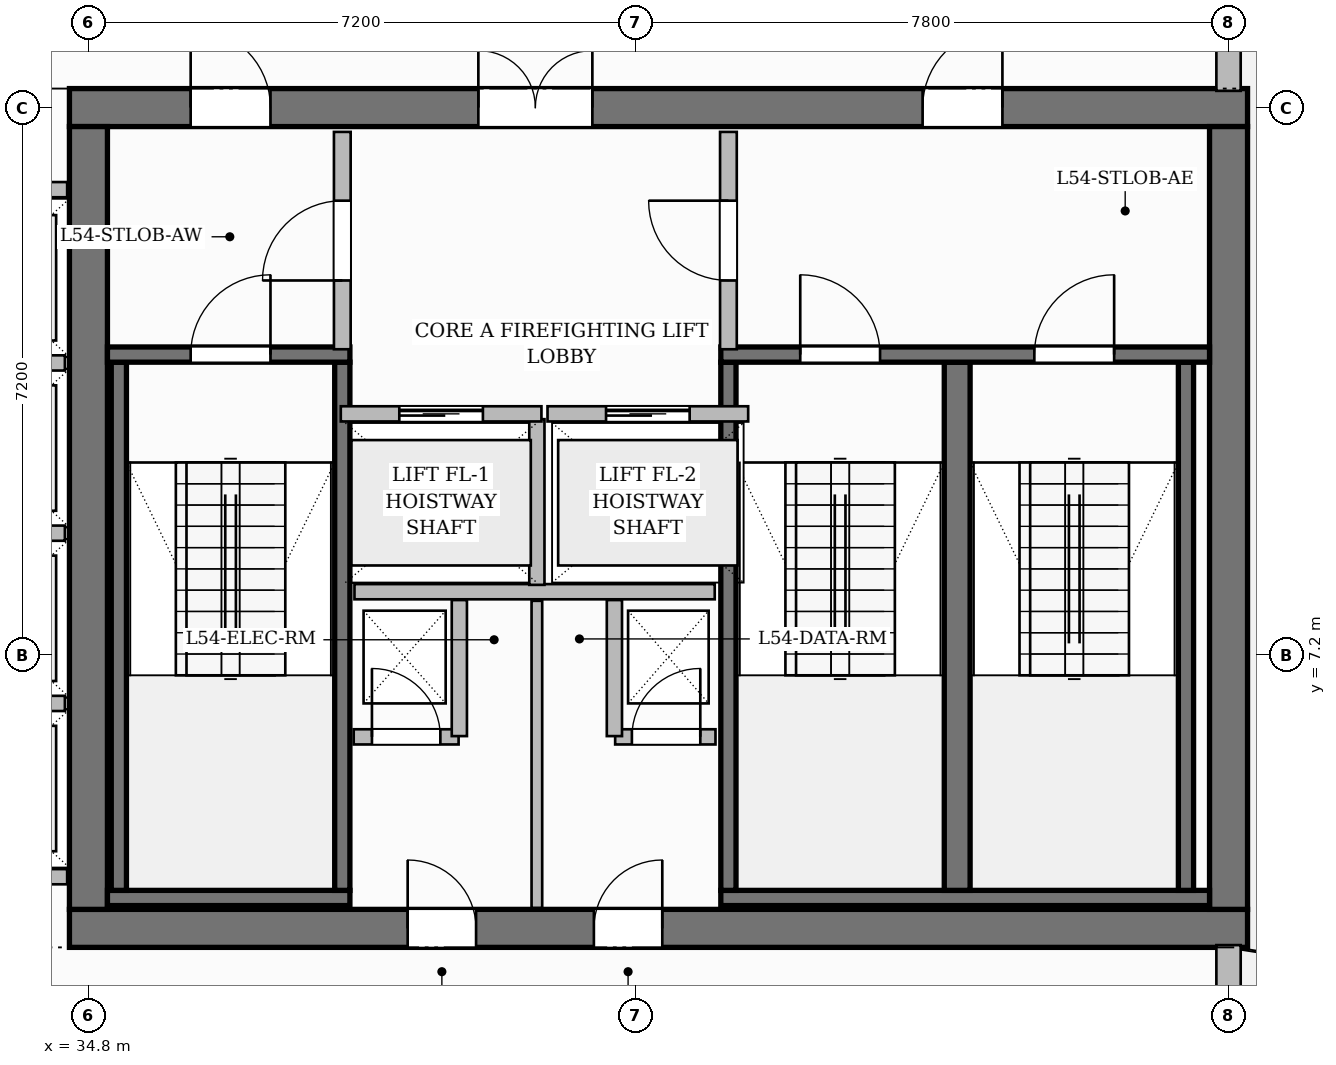
"""IFC4 building model, lengths in metres.
Left out: names, types, materials, properties, quantities, classifications, styles, units other than length and angle.
Written with IfcOpenShell. Run it as: python <this file> out.ifc"""

import sys

from ifc_helpers import new_model, si_unit, direction, frame, frame_2d, origin, place, context, subcontext, project, spatial, rectangle, extrude, source, transform, mapped, element, fill, save


model = new_model("IFC4")
c1 = context("Model", 3, precision=1e-05, world=origin(), true_north=direction((0.0, 1.0)))
c2 = subcontext(c1, "Body", "Model", "MODEL_VIEW")
j1 = project(units=[si_unit("LENGTHUNIT", "METRE"), si_unit("PLANEANGLEUNIT", "RADIAN")], contexts=[c1])
p1 = place(None, origin())
s1 = spatial("IfcSite", under=j1, at=p1, CompositionType="ELEMENT")
p2 = place(p1, origin())
s2 = spatial("IfcBuilding", under=s1, at=p2, CompositionType="ELEMENT")
p3 = place(p2, frame((0.0, 0.0, 217.3)))
s3 = spatial("IfcBuildingStorey", under=s2, at=p3, CompositionType="ELEMENT", Elevation=217.3)
p4 = place(p3, frame((34.55, 3.6, 0.0), z_axis=(0.0, 0.0, 1.0), x_axis=(1.0, 0.0, 0.0)))
e1 = element("IfcWall", 1, at=p4, inside=s3, PredefinedType="SHEAR", context=c2, shape_type="SweptSolid", body=[
    extrude(rectangle(XDim=15.5, YDim=0.5, at=frame_2d((7.75, 0.0))), origin(), (0.0, 0.0, 1.0), 3.85),
])
p5 = place(p4, frame((4.45, 0.0, 0.0)))
e2 = element("IfcOpeningElement", 2, at=p5, cuts=e1, PredefinedType="OPENING", context=c2, shape_type="SweptSolid", body=[
    extrude(rectangle(XDim=0.9, YDim=2.1, at=frame_2d((0.45, 1.05))), frame((0.0, 0.26, 0.0), z_axis=(0.0, -1.0, 0.0), x_axis=(1.0, 0.0, 0.0)), (0.0, 0.0, 1.0), 0.52),
])
p6 = place(p4, frame((6.9, 0.0, 0.0)))
e3 = element("IfcOpeningElement", 3, at=p6, cuts=e1, PredefinedType="OPENING", context=c2, shape_type="SweptSolid", body=[
    extrude(rectangle(XDim=0.9, YDim=2.1, at=frame_2d((0.45, 1.05))), frame((0.0, 0.26, 0.0), z_axis=(0.0, -1.0, 0.0), x_axis=(1.0, 0.0, 0.0)), (0.0, 0.0, 1.0), 0.52),
])
p7 = place(p3, frame((34.55, 14.4, 0.0), z_axis=(0.0, 0.0, 1.0), x_axis=(1.0, 0.0, 0.0)))
e4 = element("IfcWall", 4, at=p7, inside=s3, PredefinedType="SHEAR", context=c2, shape_type="SweptSolid", body=[
    extrude(rectangle(XDim=15.5, YDim=0.5, at=frame_2d((7.75, 0.0))), origin(), (0.0, 0.0, 1.0), 3.85),
])
p8 = place(p7, frame((5.38, 0.0, 0.0)))
e5 = element("IfcOpeningElement", 5, at=p8, cuts=e4, PredefinedType="OPENING", context=c2, shape_type="SweptSolid", body=[
    extrude(rectangle(XDim=1.5, YDim=2.2, at=frame_2d((0.75, 1.1))), frame((0.0, 0.26, 0.0), z_axis=(0.0, -1.0, 0.0), x_axis=(1.0, 0.0, 0.0)), (0.0, 0.0, 1.0), 0.52),
])
p9 = place(p7, frame((1.595, 0.0, 0.0)))
e6 = element("IfcOpeningElement", 6, at=p9, cuts=e4, PredefinedType="OPENING", context=c2, shape_type="SweptSolid", body=[
    extrude(rectangle(XDim=1.05, YDim=2.15, at=frame_2d((0.525, 1.075))), frame((0.0, 0.26, 0.0), z_axis=(0.0, -1.0, 0.0), x_axis=(1.0, 0.0, 0.0)), (0.0, 0.0, 1.0), 0.52),
])
p10 = place(p7, frame((11.225, 0.0, 0.0)))
e7 = element("IfcOpeningElement", 7, at=p10, cuts=e4, PredefinedType="OPENING", context=c2, shape_type="SweptSolid", body=[
    extrude(rectangle(XDim=1.05, YDim=2.15, at=frame_2d((0.525, 1.075))), frame((0.0, 0.26, 0.0), z_axis=(0.0, -1.0, 0.0), x_axis=(1.0, 0.0, 0.0)), (0.0, 0.0, 1.0), 0.52),
])
for number, where, z_axis, x_axis in (
    (8, (34.8, 3.85, 0.0), (0.0, 0.0, 1.0), (0.0, 1.0, 0.0)),
    (9, (49.8, 3.85, 0.0), (0.0, 0.0, 1.0), (0.0, 1.0, 0.0)),
):
    element("IfcWall", number, at=place(p3, frame(where, z_axis=z_axis, x_axis=x_axis)), inside=s3, PredefinedType="SHEAR", context=c2, shape_type="SweptSolid", body=[
        extrude(rectangle(XDim=10.3, YDim=0.5, at=frame_2d((5.15, 0.0))), origin(), (0.0, 0.0, 1.0), 3.85),
    ])
p11 = place(p3, frame((35.05, 4.0, 0.0), z_axis=(0.0, 0.0, 1.0), x_axis=(1.0, 0.0, 0.0)))
e10 = element("IfcWall", 10, at=p11, inside=s3, PredefinedType="SHEAR", context=c2, shape_type="SweptSolid", body=[
    extrude(rectangle(XDim=3.19, YDim=0.2, at=frame_2d((1.595, 0.0))), origin(), (0.0, 0.0, 1.0), 3.85),
])
for number, where, z_axis, x_axis in (
    (11, (35.2, 4.1, 0.0), (0.0, 0.0, 1.0), (0.0, 1.0, 0.0)),
    (12, (38.14, 4.1, 0.0), (0.0, 0.0, 1.0), (0.0, 1.0, 0.0)),
):
    element("IfcWall", number, at=place(p3, frame(where, z_axis=z_axis, x_axis=x_axis)), inside=s3, PredefinedType="SHEAR", context=c2, shape_type="SweptSolid", body=[
        extrude(rectangle(XDim=6.95, YDim=0.2, at=frame_2d((3.475, 0.0))), origin(), (0.0, 0.0, 1.0), 3.85),
    ])
p12 = place(p3, frame((35.05, 11.15, 0.0), z_axis=(0.0, 0.0, 1.0), x_axis=(1.0, 0.0, 0.0)))
e13 = element("IfcWall", 13, at=p12, inside=s3, PredefinedType="SHEAR", context=c2, shape_type="SweptSolid", body=[
    extrude(rectangle(XDim=3.19, YDim=0.2, at=frame_2d((1.595, 0.0))), origin(), (0.0, 0.0, 1.0), 3.85),
])
p13 = place(p12, frame((1.095, 0.0, 0.0)))
e14 = element("IfcOpeningElement", 14, at=p13, cuts=e13, PredefinedType="OPENING", context=c2, shape_type="SweptSolid", body=[
    extrude(rectangle(XDim=1.05, YDim=2.2, at=frame_2d((0.525, 1.1))), frame((0.0, 0.11, 0.0), z_axis=(0.0, -1.0, 0.0), x_axis=(1.0, 0.0, 0.0)), (0.0, 0.0, 1.0), 0.22),
])
p14 = place(p3, frame((43.12, 4.0, 0.0), z_axis=(0.0, 0.0, 1.0), x_axis=(1.0, 0.0, 0.0)))
e15 = element("IfcWall", 15, at=p14, inside=s3, PredefinedType="SHEAR", context=c2, shape_type="SweptSolid", body=[
    extrude(rectangle(XDim=6.43, YDim=0.2, at=frame_2d((3.215, 0.0))), origin(), (0.0, 0.0, 1.0), 3.85),
])
p15 = place(p3, frame((43.22, 4.1, 0.0), z_axis=(0.0, 0.0, 1.0), x_axis=(0.0, 1.0, 0.0)))
e16 = element("IfcWall", 16, at=p15, inside=s3, PredefinedType="SHEAR", context=c2, shape_type="SweptSolid", body=[
    extrude(rectangle(XDim=6.95, YDim=0.2, at=frame_2d((3.475, 0.0))), origin(), (0.0, 0.0, 1.0), 3.85),
])
p16 = place(p3, frame((46.23, 4.1, 0.0), z_axis=(0.0, 0.0, 1.0), x_axis=(0.0, 1.0, 0.0)))
e17 = element("IfcWall", 17, at=p16, inside=s3, PredefinedType="SHEAR", context=c2, shape_type="SweptSolid", body=[
    extrude(rectangle(XDim=6.95, YDim=0.34, at=frame_2d((3.475, 0.0))), origin(), (0.0, 0.0, 1.0), 3.85),
])
p17 = place(p3, frame((49.24, 4.1, 0.0), z_axis=(0.0, 0.0, 1.0), x_axis=(0.0, 1.0, 0.0)))
e18 = element("IfcWall", 18, at=p17, inside=s3, PredefinedType="SHEAR", context=c2, shape_type="SweptSolid", body=[
    extrude(rectangle(XDim=6.95, YDim=0.2, at=frame_2d((3.475, 0.0))), origin(), (0.0, 0.0, 1.0), 3.85),
])
p18 = place(p3, frame((43.12, 11.15, 0.0), z_axis=(0.0, 0.0, 1.0), x_axis=(1.0, 0.0, 0.0)))
e19 = element("IfcWall", 19, at=p18, inside=s3, PredefinedType="SHEAR", context=c2, shape_type="SweptSolid", body=[
    extrude(rectangle(XDim=6.43, YDim=0.2, at=frame_2d((3.215, 0.0))), origin(), (0.0, 0.0, 1.0), 3.85),
])
p19 = place(p18, frame((1.045, 0.0, 0.0)))
e20 = element("IfcOpeningElement", 20, at=p19, cuts=e19, PredefinedType="OPENING", context=c2, shape_type="SweptSolid", body=[
    extrude(rectangle(XDim=1.05, YDim=2.2, at=frame_2d((0.525, 1.1))), frame((0.0, 0.11, 0.0), z_axis=(0.0, -1.0, 0.0), x_axis=(1.0, 0.0, 0.0)), (0.0, 0.0, 1.0), 0.22),
])
p20 = place(p18, frame((4.125, 0.0, 0.0)))
e21 = element("IfcOpeningElement", 21, at=p20, cuts=e19, PredefinedType="OPENING", context=c2, shape_type="SweptSolid", body=[
    extrude(rectangle(XDim=1.05, YDim=2.2, at=frame_2d((0.525, 1.1))), frame((0.0, 0.11, 0.0), z_axis=(0.0, -1.0, 0.0), x_axis=(1.0, 0.0, 0.0)), (0.0, 0.0, 1.0), 0.22),
])
p21 = place(p3, frame((38.3, 8.03, 0.0), z_axis=(0.0, 0.0, 1.0), x_axis=(1.0, 0.0, 0.0)))
e22 = element("IfcWall", 22, at=p21, inside=s3, PredefinedType="PARTITIONING", context=c2, shape_type="SweptSolid", body=[
    extrude(rectangle(XDim=4.74, YDim=0.2, at=frame_2d((2.37, 0.0))), origin(), (0.0, 0.0, 1.0), 3.6),
])
p22 = place(p3, frame((40.7, 8.12, 0.0), z_axis=(0.0, 0.0, 1.0), x_axis=(0.0, 1.0, 0.0)))
e23 = element("IfcWall", 23, at=p22, inside=s3, PredefinedType="PARTITIONING", context=c2, shape_type="SweptSolid", body=[
    extrude(rectangle(XDim=2.18, YDim=0.2, at=frame_2d((1.09, 0.0))), origin(), (0.0, 0.0, 1.0), 3.6),
])
p23 = place(p3, frame((38.14, 11.22, 0.0), z_axis=(0.0, 0.0, 1.0), x_axis=(0.0, 1.0, 0.0)))
e24 = element("IfcWall", 24, at=p23, inside=s3, PredefinedType="PARTITIONING", context=c2, shape_type="SweptSolid", body=[
    extrude(rectangle(XDim=2.86, YDim=0.22, at=frame_2d((1.43, 0.0))), origin(), (0.0, 0.0, 1.0), 3.6),
])
p24 = place(p23, frame((0.905, 0.0, 0.0)))
e25 = element("IfcOpeningElement", 25, at=p24, cuts=e24, PredefinedType="OPENING", context=c2, shape_type="SweptSolid", body=[
    extrude(rectangle(XDim=1.05, YDim=2.15, at=frame_2d((0.525, 1.075))), frame((0.0, 0.12, 0.0), z_axis=(0.0, -1.0, 0.0), x_axis=(1.0, 0.0, 0.0)), (0.0, 0.0, 1.0), 0.24),
])
p25 = place(p3, frame((43.22, 11.22, 0.0), z_axis=(0.0, 0.0, 1.0), x_axis=(0.0, 1.0, 0.0)))
e26 = element("IfcWall", 26, at=p25, inside=s3, PredefinedType="PARTITIONING", context=c2, shape_type="SweptSolid", body=[
    extrude(rectangle(XDim=2.86, YDim=0.22, at=frame_2d((1.43, 0.0))), origin(), (0.0, 0.0, 1.0), 3.6),
])
p26 = place(p25, frame((0.905, 0.0, 0.0)))
e27 = element("IfcOpeningElement", 27, at=p26, cuts=e26, PredefinedType="OPENING", context=c2, shape_type="SweptSolid", body=[
    extrude(rectangle(XDim=1.05, YDim=2.15, at=frame_2d((0.525, 1.075))), frame((0.0, 0.12, 0.0), z_axis=(0.0, -1.0, 0.0), x_axis=(1.0, 0.0, 0.0)), (0.0, 0.0, 1.0), 0.24),
])
p27 = place(p3, frame((38.29, 6.12, 0.0), z_axis=(0.0, 0.0, 1.0), x_axis=(1.0, 0.0, 0.0)))
e28 = element("IfcWall", 28, at=p27, inside=s3, PredefinedType="PARTITIONING", context=c2, shape_type="SweptSolid", body=[
    extrude(rectangle(XDim=1.38, YDim=0.2, at=frame_2d((0.69, 0.0))), origin(), (0.0, 0.0, 1.0), 3.6),
])
p28 = place(p27, frame((0.24, 0.0, 0.0)))
e29 = element("IfcOpeningElement", 29, at=p28, cuts=e28, PredefinedType="OPENING", context=c2, shape_type="SweptSolid", body=[
    extrude(rectangle(XDim=0.9, YDim=2.1, at=frame_2d((0.45, 1.05))), frame((0.0, 0.11, 0.0), z_axis=(0.0, -1.0, 0.0), x_axis=(1.0, 0.0, 0.0)), (0.0, 0.0, 1.0), 0.22),
])
p29 = place(p3, frame((39.68, 6.13, 0.0), z_axis=(0.0, 0.0, 1.0), x_axis=(0.0, 1.0, 0.0)))
e30 = element("IfcWall", 30, at=p29, inside=s3, PredefinedType="PARTITIONING", context=c2, shape_type="SweptSolid", body=[
    extrude(rectangle(XDim=1.79, YDim=0.2, at=frame_2d((0.895, 0.0))), origin(), (0.0, 0.0, 1.0), 3.6),
])
p30 = place(p3, frame((41.73, 6.12, 0.0), z_axis=(0.0, 0.0, 1.0), x_axis=(1.0, 0.0, 0.0)))
e31 = element("IfcWall", 31, at=p30, inside=s3, PredefinedType="PARTITIONING", context=c2, shape_type="SweptSolid", body=[
    extrude(rectangle(XDim=1.32, YDim=0.2, at=frame_2d((0.66, 0.0))), origin(), (0.0, 0.0, 1.0), 3.6),
])
p31 = place(p30, frame((0.22, 0.0, 0.0)))
e32 = element("IfcOpeningElement", 32, at=p31, cuts=e31, PredefinedType="OPENING", context=c2, shape_type="SweptSolid", body=[
    extrude(rectangle(XDim=0.9, YDim=2.1, at=frame_2d((0.45, 1.05))), frame((0.0, 0.11, 0.0), z_axis=(0.0, -1.0, 0.0), x_axis=(1.0, 0.0, 0.0)), (0.0, 0.0, 1.0), 0.22),
])
p32 = place(p3, frame((41.72, 6.13, 0.0), z_axis=(0.0, 0.0, 1.0), x_axis=(0.0, 1.0, 0.0)))
e33 = element("IfcWall", 33, at=p32, inside=s3, PredefinedType="PARTITIONING", context=c2, shape_type="SweptSolid", body=[
    extrude(rectangle(XDim=1.79, YDim=0.2, at=frame_2d((0.895, 0.0))), origin(), (0.0, 0.0, 1.0), 3.6),
])
p33 = place(p3, frame((40.7, 3.87, 0.0), z_axis=(0.0, 0.0, 1.0), x_axis=(0.0, 1.0, 0.0)))
e34 = element("IfcWall", 34, at=p33, inside=s3, PredefinedType="PARTITIONING", context=c2, shape_type="SweptSolid", body=[
    extrude(rectangle(XDim=4.04, YDim=0.14, at=frame_2d((2.02, 0.0))), origin(), (0.0, 0.0, 1.0), 3.6),
])
for number, where, z_axis, x_axis in (
    (35, (32.16, 4.28, 0.0), (0.0, 0.0, 1.0), (1.0, 0.0, 0.0)),
    (36, (32.16, 13.32, 0.0), (0.0, 0.0, 1.0), (1.0, 0.0, 0.0)),
):
    element("IfcWall", number, at=place(p3, frame(where, z_axis=z_axis, x_axis=x_axis)), inside=s3, PredefinedType="PARTITIONING", context=c2, shape_type="SweptSolid", body=[
        extrude(rectangle(XDim=2.36, YDim=0.2, at=frame_2d((1.18, 0.0))), origin(), (0.0, 0.0, 1.0), 3.6),
    ])
for number, where, z_axis, x_axis in (
    (37, (32.26, 6.56, 0.0), (0.0, 0.0, 1.0), (1.0, 0.0, 0.0)),
    (38, (32.26, 8.8, 0.0), (0.0, 0.0, 1.0), (1.0, 0.0, 0.0)),
    (39, (32.26, 11.04, 0.0), (0.0, 0.0, 1.0), (1.0, 0.0, 0.0)),
):
    element("IfcWall", number, at=place(p3, frame(where, z_axis=z_axis, x_axis=x_axis)), inside=s3, PredefinedType="PARTITIONING", context=c2, shape_type="SweptSolid", body=[
        extrude(rectangle(XDim=2.23, YDim=0.2, at=frame_2d((1.115, 0.0))), origin(), (0.0, 0.0, 1.0), 3.6),
    ])
p34 = place(p3, frame((38.12, 10.37, 0.0), z_axis=(0.0, 0.0, 1.0), x_axis=(1.0, 0.0, 0.0)))
e40 = element("IfcWall", 40, at=p34, inside=s3, PredefinedType="PARTITIONING", context=c2, shape_type="SweptSolid", body=[
    extrude(rectangle(XDim=2.64, YDim=0.2, at=frame_2d((1.32, 0.0))), origin(), (0.0, 0.0, 1.0), 3.6),
])
p35 = place(p34, frame((0.77, 0.0, 0.0)))
e41 = element("IfcOpeningElement", 41, at=p35, cuts=e40, PredefinedType="OPENING", context=c2, shape_type="SweptSolid", body=[
    extrude(rectangle(XDim=1.1, YDim=2.2, at=frame_2d((0.55, 1.1))), frame((0.0, 0.11, 0.0), z_axis=(0.0, -1.0, 0.0), x_axis=(1.0, 0.0, 0.0)), (0.0, 0.0, 1.0), 0.22),
])
p36 = place(p3, frame((40.84, 10.37, 0.0), z_axis=(0.0, 0.0, 1.0), x_axis=(1.0, 0.0, 0.0)))
e42 = element("IfcWall", 42, at=p36, inside=s3, PredefinedType="PARTITIONING", context=c2, shape_type="SweptSolid", body=[
    extrude(rectangle(XDim=2.64, YDim=0.2, at=frame_2d((1.32, 0.0))), origin(), (0.0, 0.0, 1.0), 3.6),
])
p37 = place(p36, frame((0.77, 0.0, 0.0)))
e43 = element("IfcOpeningElement", 43, at=p37, cuts=e42, PredefinedType="OPENING", context=c2, shape_type="SweptSolid", body=[
    extrude(rectangle(XDim=1.1, YDim=2.2, at=frame_2d((0.55, 1.1))), frame((0.0, 0.11, 0.0), z_axis=(0.0, -1.0, 0.0), x_axis=(1.0, 0.0, 0.0)), (0.0, 0.0, 1.0), 0.22),
])
p38 = place(p3, frame((49.8, 0.05, 0.0), z_axis=(0.0, 0.0, 1.0), x_axis=(0.0, 1.0, 0.0)))
e44 = element("IfcWall", 44, at=p38, inside=s3, PredefinedType="SOLIDWALL", context=c2, shape_type="SweptSolid", body=[
    extrude(rectangle(XDim=3.33, YDim=0.32, at=frame_2d((1.665, 0.0))), origin(), (0.0, 0.0, 1.0), 3.6),
])
p39 = place(p3, frame((49.8, 14.62, 0.0), z_axis=(0.0, 0.0, 1.0), x_axis=(0.0, 1.0, 0.0)))
e45 = element("IfcWall", 45, at=p39, inside=s3, PredefinedType="SOLIDWALL", context=c2, shape_type="SweptSolid", body=[
    extrude(rectangle(XDim=6.93, YDim=0.32, at=frame_2d((3.465, 0.0))), origin(), (0.0, 0.0, 1.0), 3.135),
])
p40 = place(p39, frame((1.889, 0.0, 0.0)))
e46 = element("IfcOpeningElement", 46, at=p40, cuts=e45, PredefinedType="OPENING", context=c2, shape_type="SweptSolid", body=[
    extrude(rectangle(XDim=1.2, YDim=2.2, at=frame_2d((0.6, 1.1))), frame((0.0, 0.17, 0.0), z_axis=(0.0, -1.0, 0.0), x_axis=(1.0, 0.0, 0.0)), (0.0, 0.0, 1.0), 0.34),
])
p41 = place(p39, frame((3.884, 0.0, 0.8)))
e47 = element("IfcOpeningElement", 47, at=p41, cuts=e45, PredefinedType="OPENING", context=c2, shape_type="SweptSolid", body=[
    extrude(rectangle(XDim=1.8, YDim=1.85, at=frame_2d((0.9, 0.925))), frame((0.0, 0.17, 0.0), z_axis=(0.0, -1.0, 0.0), x_axis=(1.0, 0.0, 0.0)), (0.0, 0.0, 1.0), 0.34),
])
m1 = source(origin(), c2, "Body", "SweptSolid", [
    extrude(rectangle(XDim=1.05, YDim=2.2, at=frame_2d((0.525, 1.1))), frame((0.0, 0.025, 0.0), z_axis=(0.0, -1.0, 0.0), x_axis=(1.0, 0.0, 0.0)), (0.0, 0.0, 1.0), 0.05),
])
p42 = place(p13, origin())
e48 = element("IfcDoor", 48, at=p42, inside=s3, OperationType="SINGLE_SWING_RIGHT", PredefinedType="DOOR", context=c2, shape_type="MappedRepresentation", body=[
    mapped(m1, transform((0.0, 0.0, 0.0), scale=1.0)),
])
fill(e14, e48)
p43 = place(p19, origin())
e49 = element("IfcDoor", 49, at=p43, inside=s3, OperationType="SINGLE_SWING_LEFT", PredefinedType="DOOR", context=c2, shape_type="MappedRepresentation", body=[
    mapped(m1, transform((0.0, 0.0, 0.0), scale=1.0)),
])
fill(e20, e49)
p44 = place(p20, origin())
e50 = element("IfcDoor", 50, at=p44, inside=s3, OperationType="SINGLE_SWING_RIGHT", PredefinedType="DOOR", context=c2, shape_type="MappedRepresentation", body=[
    mapped(m1, transform((0.0, 0.0, 0.0), scale=1.0)),
])
fill(e21, e50)
m2 = source(origin(), c2, "Body", "SweptSolid", [
    extrude(rectangle(XDim=1.05, YDim=2.15, at=frame_2d((0.525, 1.075))), frame((0.0, 0.025, 0.0), z_axis=(0.0, -1.0, 0.0), x_axis=(1.0, 0.0, 0.0)), (0.0, 0.0, 1.0), 0.05),
])
p45 = place(p24, origin())
e51 = element("IfcDoor", 51, at=p45, inside=s3, OperationType="SINGLE_SWING_LEFT", PredefinedType="DOOR", context=c2, shape_type="MappedRepresentation", body=[
    mapped(m2, transform((0.0, 0.0, 0.0), scale=1.0)),
])
fill(e25, e51)
p46 = place(p26, origin())
e52 = element("IfcDoor", 52, at=p46, inside=s3, OperationType="SINGLE_SWING_RIGHT", PredefinedType="DOOR", context=c2, shape_type="MappedRepresentation", body=[
    mapped(m2, transform((0.0, 0.0, 0.0), scale=1.0)),
])
fill(e27, e52)
m3 = source(origin(), c2, "Body", "SweptSolid", [
    extrude(rectangle(XDim=1.5, YDim=2.2, at=frame_2d((0.75, 1.1))), frame((0.0, 0.025, 0.0), z_axis=(0.0, -1.0, 0.0), x_axis=(1.0, 0.0, 0.0)), (0.0, 0.0, 1.0), 0.05),
])
p47 = place(p8, origin())
e53 = element("IfcDoor", 53, at=p47, inside=s3, OperationType="DOUBLE_DOOR_SINGLE_SWING", PredefinedType="DOOR", context=c2, shape_type="MappedRepresentation", body=[
    mapped(m3, transform((0.0, 0.0, 0.0), scale=1.0)),
])
fill(e5, e53)
p48 = place(p9, origin())
e54 = element("IfcDoor", 54, at=p48, inside=s3, OperationType="SINGLE_SWING_LEFT", PredefinedType="DOOR", context=c2, shape_type="MappedRepresentation", body=[
    mapped(m2, transform((0.0, 0.0, 0.0), scale=1.0)),
])
fill(e6, e54)
p49 = place(p10, origin())
e55 = element("IfcDoor", 55, at=p49, inside=s3, OperationType="SINGLE_SWING_RIGHT", PredefinedType="DOOR", context=c2, shape_type="MappedRepresentation", body=[
    mapped(m2, transform((0.0, 0.0, 0.0), scale=1.0)),
])
fill(e7, e55)
m4 = source(origin(), c2, "Body", "SweptSolid", [
    extrude(rectangle(XDim=0.9, YDim=2.1, at=frame_2d((0.45, 1.05))), frame((0.0, 0.025, 0.0), z_axis=(0.0, -1.0, 0.0), x_axis=(1.0, 0.0, 0.0)), (0.0, 0.0, 1.0), 0.05),
])
p50 = place(p28, origin())
e56 = element("IfcDoor", 56, at=p50, inside=s3, OperationType="SINGLE_SWING_LEFT", PredefinedType="DOOR", context=c2, shape_type="MappedRepresentation", body=[
    mapped(m4, transform((0.0, 0.0, 0.0), scale=1.0)),
])
fill(e29, e56)
p51 = place(p31, origin())
e57 = element("IfcDoor", 57, at=p51, inside=s3, OperationType="SINGLE_SWING_RIGHT", PredefinedType="DOOR", context=c2, shape_type="MappedRepresentation", body=[
    mapped(m4, transform((0.0, 0.0, 0.0), scale=1.0)),
])
fill(e32, e57)
p52 = place(p5, origin())
e58 = element("IfcDoor", 58, at=p52, inside=s3, OperationType="SINGLE_SWING_LEFT", PredefinedType="DOOR", context=c2, shape_type="MappedRepresentation", body=[
    mapped(m4, transform((0.0, 0.0, 0.0), scale=1.0)),
])
fill(e2, e58)
p53 = place(p6, origin())
e59 = element("IfcDoor", 59, at=p53, inside=s3, OperationType="SINGLE_SWING_RIGHT", PredefinedType="DOOR", context=c2, shape_type="MappedRepresentation", body=[
    mapped(m4, transform((0.0, 0.0, 0.0), scale=1.0)),
])
fill(e3, e59)
m5 = source(origin(), c2, "Body", "SweptSolid", [
    extrude(rectangle(XDim=1.1, YDim=2.2, at=frame_2d((0.55, 1.1))), frame((0.0, 0.025, 0.0), z_axis=(0.0, -1.0, 0.0), x_axis=(1.0, 0.0, 0.0)), (0.0, 0.0, 1.0), 0.05),
])
p54 = place(p35, origin())
e60 = element("IfcDoor", 60, at=p54, inside=s3, OperationType="SLIDING_TO_LEFT", PredefinedType="DOOR", context=c2, shape_type="MappedRepresentation", body=[
    mapped(m5, transform((0.0, 0.0, 0.0), scale=1.0)),
])
fill(e41, e60)
p55 = place(p37, origin())
e61 = element("IfcDoor", 61, at=p55, inside=s3, OperationType="SLIDING_TO_LEFT", PredefinedType="DOOR", context=c2, shape_type="MappedRepresentation", body=[
    mapped(m5, transform((0.0, 0.0, 0.0), scale=1.0)),
])
fill(e43, e61)
save(model, sys.argv[1])
